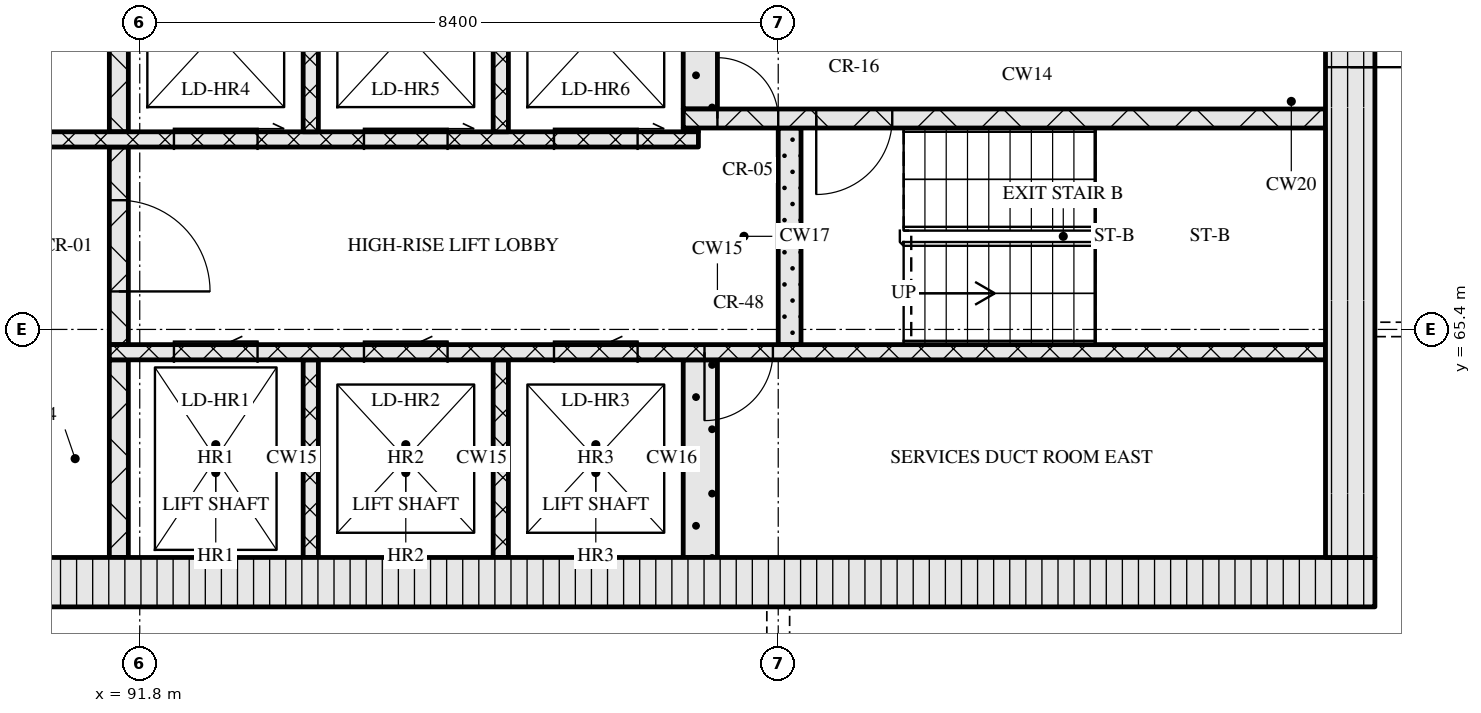
"""IFC4 building model, lengths in metres.
Left out: names, types, materials, properties, quantities, classifications, styles, units other than length and angle.
Written with IfcOpenShell. Run it as: python <this file> out.ifc"""

import sys

from ifc_helpers import new_model, si_unit, direction, frame, frame_2d, origin, place, context, subcontext, project, spatial, rectangle, extrude, element, fill, save


model = new_model("IFC4")
c1 = context("Model", 3, precision=1e-05, world=origin(), true_north=direction((0.0, 1.0)))
c2 = subcontext(c1, "Body", "Model", "MODEL_VIEW")
j1 = project(units=[si_unit("LENGTHUNIT", "METRE"), si_unit("PLANEANGLEUNIT", "RADIAN")], contexts=[c1])
p1 = place(None, origin())
s1 = spatial("IfcSite", under=j1, at=p1, CompositionType="ELEMENT")
p2 = place(p1, origin())
s2 = spatial("IfcBuilding", under=s1, at=p2, CompositionType="ELEMENT")
p3 = place(p2, frame((0.0, 0.0, 212.7)))
s3 = spatial("IfcBuildingStorey", under=s2, at=p3, CompositionType="ELEMENT", Elevation=212.7)
p4 = place(p3, frame((67.15, 62.075, 0.0), z_axis=(0.0, 0.0, 1.0), x_axis=(1.0, 0.0, 0.0)))
e1 = element("IfcWall", 1, at=p4, inside=s3, PredefinedType="SOLIDWALL", context=c2, shape_type="SweptSolid", body=[
    extrude(rectangle(XDim=40.9, YDim=0.65, at=frame_2d((20.45, 0.0))), origin(), (0.0, 0.0, 1.0), 3.32),
])
p5 = place(p4, frame((20.8, 0.0, 0.0)))
e2 = element("IfcOpeningElement", 2, at=p5, cuts=e1, PredefinedType="OPENING", context=c2, shape_type="SweptSolid", body=[
    extrude(rectangle(XDim=1.8, YDim=2.1, at=frame_2d((0.9, 1.05))), frame((0.0, 0.335, 0.0), z_axis=(0.0, -1.0, 0.0), x_axis=(1.0, 0.0, 0.0)), (0.0, 0.0, 1.0), 0.67),
])
p6 = place(p3, frame((107.725, 62.4, 0.0), z_axis=(0.0, 0.0, 1.0), x_axis=(0.0, 1.0, 0.0)))
e3 = element("IfcWall", 3, at=p6, inside=s3, PredefinedType="SOLIDWALL", context=c2, shape_type="SweptSolid", body=[
    extrude(rectangle(XDim=12.0, YDim=0.65, at=frame_2d((6.0, 0.0))), origin(), (0.0, 0.0, 1.0), 3.32),
])
p7 = place(p6, frame((6.45, 0.0, 0.0)))
e4 = element("IfcOpeningElement", 4, at=p7, cuts=e3, PredefinedType="OPENING", context=c2, shape_type="SweptSolid", body=[
    extrude(rectangle(XDim=1.2, YDim=2.1, at=frame_2d((0.6, 1.05))), frame((0.0, 0.335, 0.0), z_axis=(0.0, -1.0, 0.0), x_axis=(1.0, 0.0, 0.0)), (0.0, 0.0, 1.0), 0.67),
])
p8 = place(p3, frame((91.525, 62.4, 0.0), z_axis=(0.0, 0.0, 1.0), x_axis=(0.0, 1.0, 0.0)))
e5 = element("IfcWall", 5, at=p8, inside=s3, PredefinedType="SOLIDWALL", context=c2, shape_type="SweptSolid", body=[
    extrude(rectangle(XDim=2.6, YDim=0.25, at=frame_2d((1.3, 0.0))), origin(), (0.0, 0.0, 1.0), 3.32),
])
for number, where, z_axis, x_axis in (
    (6, (94.05, 62.4, 0.0), (0.0, 0.0, 1.0), (0.0, 1.0, 0.0)),
    (7, (96.55, 62.4, 0.0), (0.0, 0.0, 1.0), (0.0, 1.0, 0.0)),
):
    element("IfcWall", number, at=place(p3, frame(where, z_axis=z_axis, x_axis=x_axis)), inside=s3, PredefinedType="SOLIDWALL", context=c2, shape_type="SweptSolid", body=[
        extrude(rectangle(XDim=2.6, YDim=0.2, at=frame_2d((1.3, 0.0))), origin(), (0.0, 0.0, 1.0), 3.32),
    ])
p9 = place(p3, frame((99.175, 62.4, 0.0), z_axis=(0.0, 0.0, 1.0), x_axis=(0.0, 1.0, 0.0)))
e8 = element("IfcWall", 8, at=p9, inside=s3, PredefinedType="SOLIDWALL", context=c2, shape_type="SweptSolid", body=[
    extrude(rectangle(XDim=2.6, YDim=0.45, at=frame_2d((1.3, 0.0))), origin(), (0.0, 0.0, 1.0), 3.32),
])
p10 = place(p3, frame((91.4, 65.1, 0.0), z_axis=(0.0, 0.0, 1.0), x_axis=(1.0, 0.0, 0.0)))
e9 = element("IfcWall", 9, at=p10, inside=s3, PredefinedType="SOLIDWALL", context=c2, shape_type="SweptSolid", body=[
    extrude(rectangle(XDim=16.0, YDim=0.2, at=frame_2d((8.0, 0.0))), origin(), (0.0, 0.0, 1.0), 3.32),
])
p11 = place(p10, frame((0.85, 0.0, 0.0)))
e10 = element("IfcOpeningElement", 10, at=p11, cuts=e9, PredefinedType="OPENING", context=c2, shape_type="SweptSolid", body=[
    extrude(rectangle(XDim=1.1, YDim=2.1, at=frame_2d((0.55, 1.05))), frame((0.0, 0.11, 0.0), z_axis=(0.0, -1.0, 0.0), x_axis=(1.0, 0.0, 0.0)), (0.0, 0.0, 1.0), 0.22),
])
p12 = place(p10, frame((3.35, 0.0, 0.0)))
e11 = element("IfcOpeningElement", 11, at=p12, cuts=e9, PredefinedType="OPENING", context=c2, shape_type="SweptSolid", body=[
    extrude(rectangle(XDim=1.1, YDim=2.1, at=frame_2d((0.55, 1.05))), frame((0.0, 0.11, 0.0), z_axis=(0.0, -1.0, 0.0), x_axis=(1.0, 0.0, 0.0)), (0.0, 0.0, 1.0), 0.22),
])
p13 = place(p10, frame((5.85, 0.0, 0.0)))
e12 = element("IfcOpeningElement", 12, at=p13, cuts=e9, PredefinedType="OPENING", context=c2, shape_type="SweptSolid", body=[
    extrude(rectangle(XDim=1.1, YDim=2.1, at=frame_2d((0.55, 1.05))), frame((0.0, 0.11, 0.0), z_axis=(0.0, -1.0, 0.0), x_axis=(1.0, 0.0, 0.0)), (0.0, 0.0, 1.0), 0.22),
])
p14 = place(p10, frame((7.83, 0.0, 0.0)))
e13 = element("IfcOpeningElement", 13, at=p14, cuts=e9, PredefinedType="OPENING", context=c2, shape_type="SweptSolid", body=[
    extrude(rectangle(XDim=0.9, YDim=2.1, at=frame_2d((0.45, 1.05))), frame((0.0, 0.11, 0.0), z_axis=(0.0, -1.0, 0.0), x_axis=(1.0, 0.0, 0.0)), (0.0, 0.0, 1.0), 0.22),
])
p15 = place(p3, frame((91.525, 65.2, 0.0), z_axis=(0.0, 0.0, 1.0), x_axis=(0.0, 1.0, 0.0)))
e14 = element("IfcWall", 14, at=p15, inside=s3, PredefinedType="SOLIDWALL", context=c2, shape_type="SweptSolid", body=[
    extrude(rectangle(XDim=2.6, YDim=0.25, at=frame_2d((1.3, 0.0))), origin(), (0.0, 0.0, 1.0), 3.32),
])
p16 = place(p15, frame((0.7, 0.0, 0.0)))
e15 = element("IfcOpeningElement", 15, at=p16, cuts=e14, PredefinedType="OPENING", context=c2, shape_type="SweptSolid", body=[
    extrude(rectangle(XDim=1.2, YDim=2.1, at=frame_2d((0.6, 1.05))), frame((0.0, 0.135, 0.0), z_axis=(0.0, -1.0, 0.0), x_axis=(1.0, 0.0, 0.0)), (0.0, 0.0, 1.0), 0.27),
])
p17 = place(p3, frame((100.35, 65.2, 0.0), z_axis=(0.0, 0.0, 1.0), x_axis=(0.0, 1.0, 0.0)))
e16 = element("IfcWall", 16, at=p17, inside=s3, PredefinedType="SOLIDWALL", context=c2, shape_type="SweptSolid", body=[
    extrude(rectangle(XDim=2.85, YDim=0.3, at=frame_2d((1.425, 0.0))), origin(), (0.0, 0.0, 1.0), 3.32),
])
p18 = place(p3, frame((76.05, 67.9, 0.0), z_axis=(0.0, 0.0, 1.0), x_axis=(1.0, 0.0, 0.0)))
e17 = element("IfcWall", 17, at=p18, inside=s3, PredefinedType="SOLIDWALL", context=c2, shape_type="SweptSolid", body=[
    extrude(rectangle(XDim=23.1, YDim=0.2, at=frame_2d((11.55, 0.0))), origin(), (0.0, 0.0, 1.0), 3.32),
])
p19 = place(p18, frame((1.4, 0.0, 0.0)))
e18 = element("IfcOpeningElement", 18, at=p19, cuts=e17, PredefinedType="OPENING", context=c2, shape_type="SweptSolid", body=[
    extrude(rectangle(XDim=0.9, YDim=2.1, at=frame_2d((0.45, 1.05))), frame((0.0, 0.11, 0.0), z_axis=(0.0, -1.0, 0.0), x_axis=(1.0, 0.0, 0.0)), (0.0, 0.0, 1.0), 0.22),
])
p20 = place(p18, frame((5.11, 0.0, 0.0)))
e19 = element("IfcOpeningElement", 19, at=p20, cuts=e17, PredefinedType="OPENING", context=c2, shape_type="SweptSolid", body=[
    extrude(rectangle(XDim=0.9, YDim=2.1, at=frame_2d((0.45, 1.05))), frame((0.0, 0.11, 0.0), z_axis=(0.0, -1.0, 0.0), x_axis=(1.0, 0.0, 0.0)), (0.0, 0.0, 1.0), 0.22),
])
p21 = place(p18, frame((8.45, 0.0, 0.0)))
e20 = element("IfcOpeningElement", 20, at=p21, cuts=e17, PredefinedType="OPENING", context=c2, shape_type="SweptSolid", body=[
    extrude(rectangle(XDim=0.9, YDim=2.1, at=frame_2d((0.45, 1.05))), frame((0.0, 0.11, 0.0), z_axis=(0.0, -1.0, 0.0), x_axis=(1.0, 0.0, 0.0)), (0.0, 0.0, 1.0), 0.22),
])
p22 = place(p18, frame((10.91, 0.0, 0.0)))
e21 = element("IfcOpeningElement", 21, at=p22, cuts=e17, PredefinedType="OPENING", context=c2, shape_type="SweptSolid", body=[
    extrude(rectangle(XDim=0.9, YDim=2.1, at=frame_2d((0.45, 1.05))), frame((0.0, 0.11, 0.0), z_axis=(0.0, -1.0, 0.0), x_axis=(1.0, 0.0, 0.0)), (0.0, 0.0, 1.0), 0.22),
])
p23 = place(p18, frame((13.55, 0.0, 0.0)))
e22 = element("IfcOpeningElement", 22, at=p23, cuts=e17, PredefinedType="OPENING", context=c2, shape_type="SweptSolid", body=[
    extrude(rectangle(XDim=1.0, YDim=2.1, at=frame_2d((0.5, 1.05))), frame((0.0, 0.11, 0.0), z_axis=(0.0, -1.0, 0.0), x_axis=(1.0, 0.0, 0.0)), (0.0, 0.0, 1.0), 0.22),
])
p24 = place(p18, frame((16.2, 0.0, 0.0)))
e23 = element("IfcOpeningElement", 23, at=p24, cuts=e17, PredefinedType="OPENING", context=c2, shape_type="SweptSolid", body=[
    extrude(rectangle(XDim=1.1, YDim=2.1, at=frame_2d((0.55, 1.05))), frame((0.0, 0.11, 0.0), z_axis=(0.0, -1.0, 0.0), x_axis=(1.0, 0.0, 0.0)), (0.0, 0.0, 1.0), 0.22),
])
p25 = place(p18, frame((18.7, 0.0, 0.0)))
e24 = element("IfcOpeningElement", 24, at=p25, cuts=e17, PredefinedType="OPENING", context=c2, shape_type="SweptSolid", body=[
    extrude(rectangle(XDim=1.1, YDim=2.1, at=frame_2d((0.55, 1.05))), frame((0.0, 0.11, 0.0), z_axis=(0.0, -1.0, 0.0), x_axis=(1.0, 0.0, 0.0)), (0.0, 0.0, 1.0), 0.22),
])
p26 = place(p18, frame((21.2, 0.0, 0.0)))
e25 = element("IfcOpeningElement", 25, at=p26, cuts=e17, PredefinedType="OPENING", context=c2, shape_type="SweptSolid", body=[
    extrude(rectangle(XDim=1.1, YDim=2.1, at=frame_2d((0.55, 1.05))), frame((0.0, 0.11, 0.0), z_axis=(0.0, -1.0, 0.0), x_axis=(1.0, 0.0, 0.0)), (0.0, 0.0, 1.0), 0.22),
])
p27 = place(p3, frame((91.525, 68.0, 0.0), z_axis=(0.0, 0.0, 1.0), x_axis=(0.0, 1.0, 0.0)))
e26 = element("IfcWall", 26, at=p27, inside=s3, PredefinedType="SOLIDWALL", context=c2, shape_type="SweptSolid", body=[
    extrude(rectangle(XDim=2.6, YDim=0.25, at=frame_2d((1.3, 0.0))), origin(), (0.0, 0.0, 1.0), 3.32),
])
for number, where, z_axis, x_axis in (
    (27, (94.05, 68.0, 0.0), (0.0, 0.0, 1.0), (0.0, 1.0, 0.0)),
    (28, (96.55, 68.0, 0.0), (0.0, 0.0, 1.0), (0.0, 1.0, 0.0)),
):
    element("IfcWall", number, at=place(p3, frame(where, z_axis=z_axis, x_axis=x_axis)), inside=s3, PredefinedType="SOLIDWALL", context=c2, shape_type="SweptSolid", body=[
        extrude(rectangle(XDim=2.6, YDim=0.2, at=frame_2d((1.3, 0.0))), origin(), (0.0, 0.0, 1.0), 3.32),
    ])
p28 = place(p3, frame((98.95, 68.025, 0.0), z_axis=(0.0, 0.0, 1.0), x_axis=(1.0, 0.0, 0.0)))
e29 = element("IfcWall", 29, at=p28, inside=s3, PredefinedType="SOLIDWALL", context=c2, shape_type="SweptSolid", body=[
    extrude(rectangle(XDim=0.2, YDim=0.05, at=frame_2d((0.1, 0.0))), origin(), (0.0, 0.0, 1.0), 3.32),
])
p29 = place(p3, frame((98.95, 68.175, 0.0), z_axis=(0.0, 0.0, 1.0), x_axis=(1.0, 0.0, 0.0)))
e30 = element("IfcWall", 30, at=p29, inside=s3, PredefinedType="SOLIDWALL", context=c2, shape_type="SweptSolid", body=[
    extrude(rectangle(XDim=8.45, YDim=0.25, at=frame_2d((4.225, 0.0))), origin(), (0.0, 0.0, 1.0), 3.32),
])
p30 = place(p29, frame((0.45, 0.0, 0.0)))
e31 = element("IfcOpeningElement", 31, at=p30, cuts=e30, PredefinedType="OPENING", context=c2, shape_type="SweptSolid", body=[
    extrude(rectangle(XDim=0.8, YDim=2.1, at=frame_2d((0.4, 1.05))), frame((0.0, 0.135, 0.0), z_axis=(0.0, -1.0, 0.0), x_axis=(1.0, 0.0, 0.0)), (0.0, 0.0, 1.0), 0.27),
])
p31 = place(p29, frame((1.75, 0.0, 0.0)))
e32 = element("IfcOpeningElement", 32, at=p31, cuts=e30, PredefinedType="OPENING", context=c2, shape_type="SweptSolid", body=[
    extrude(rectangle(XDim=1.0, YDim=2.1, at=frame_2d((0.5, 1.05))), frame((0.0, 0.135, 0.0), z_axis=(0.0, -1.0, 0.0), x_axis=(1.0, 0.0, 0.0)), (0.0, 0.0, 1.0), 0.27),
])
p32 = place(p3, frame((99.175, 68.3, 0.0), z_axis=(0.0, 0.0, 1.0), x_axis=(0.0, 1.0, 0.0)))
e33 = element("IfcWall", 33, at=p32, inside=s3, PredefinedType="SOLIDWALL", context=c2, shape_type="SweptSolid", body=[
    extrude(rectangle(XDim=2.3, YDim=0.45, at=frame_2d((1.15, 0.0))), origin(), (0.0, 0.0, 1.0), 3.32),
])
p33 = place(p11, origin())
e34 = element("IfcDoor", 34, at=p33, inside=s3, OperationType="SLIDING_TO_LEFT", PredefinedType="DOOR", context=c2, shape_type="SweptSolid", body=[
    extrude(rectangle(XDim=1.1, YDim=2.1, at=frame_2d((0.55, 1.05))), frame((0.0, 0.025, 0.0), z_axis=(0.0, -1.0, 0.0), x_axis=(1.0, 0.0, 0.0)), (0.0, 0.0, 1.0), 0.05),
])
fill(e10, e34)
p34 = place(p12, origin())
e35 = element("IfcDoor", 35, at=p34, inside=s3, OperationType="SLIDING_TO_LEFT", PredefinedType="DOOR", context=c2, shape_type="SweptSolid", body=[
    extrude(rectangle(XDim=1.1, YDim=2.1, at=frame_2d((0.55, 1.05))), frame((0.0, 0.025, 0.0), z_axis=(0.0, -1.0, 0.0), x_axis=(1.0, 0.0, 0.0)), (0.0, 0.0, 1.0), 0.05),
])
fill(e11, e35)
p35 = place(p13, origin())
e36 = element("IfcDoor", 36, at=p35, inside=s3, OperationType="SLIDING_TO_LEFT", PredefinedType="DOOR", context=c2, shape_type="SweptSolid", body=[
    extrude(rectangle(XDim=1.1, YDim=2.1, at=frame_2d((0.55, 1.05))), frame((0.0, 0.025, 0.0), z_axis=(0.0, -1.0, 0.0), x_axis=(1.0, 0.0, 0.0)), (0.0, 0.0, 1.0), 0.05),
])
fill(e12, e36)
p36 = place(p14, origin())
e37 = element("IfcDoor", 37, at=p36, inside=s3, OperationType="SINGLE_SWING_RIGHT", PredefinedType="DOOR", context=c2, shape_type="SweptSolid", body=[
    extrude(rectangle(XDim=0.9, YDim=2.1, at=frame_2d((0.45, 1.05))), frame((0.0, 0.025, 0.0), z_axis=(0.0, -1.0, 0.0), x_axis=(1.0, 0.0, 0.0)), (0.0, 0.0, 1.0), 0.05),
])
fill(e13, e37)
p37 = place(p16, origin())
e38 = element("IfcDoor", 38, at=p37, inside=s3, OperationType="SINGLE_SWING_RIGHT", PredefinedType="DOOR", context=c2, shape_type="SweptSolid", body=[
    extrude(rectangle(XDim=1.2, YDim=2.1, at=frame_2d((0.6, 1.05))), frame((0.0, 0.025, 0.0), z_axis=(0.0, -1.0, 0.0), x_axis=(1.0, 0.0, 0.0)), (0.0, 0.0, 1.0), 0.05),
])
fill(e15, e38)
p38 = place(p24, origin())
e39 = element("IfcDoor", 39, at=p38, inside=s3, OperationType="SLIDING_TO_RIGHT", PredefinedType="DOOR", context=c2, shape_type="SweptSolid", body=[
    extrude(rectangle(XDim=1.1, YDim=2.1, at=frame_2d((0.55, 1.05))), frame((0.0, 0.025, 0.0), z_axis=(0.0, -1.0, 0.0), x_axis=(1.0, 0.0, 0.0)), (0.0, 0.0, 1.0), 0.05),
])
fill(e23, e39)
p39 = place(p25, origin())
e40 = element("IfcDoor", 40, at=p39, inside=s3, OperationType="SLIDING_TO_RIGHT", PredefinedType="DOOR", context=c2, shape_type="SweptSolid", body=[
    extrude(rectangle(XDim=1.1, YDim=2.1, at=frame_2d((0.55, 1.05))), frame((0.0, 0.025, 0.0), z_axis=(0.0, -1.0, 0.0), x_axis=(1.0, 0.0, 0.0)), (0.0, 0.0, 1.0), 0.05),
])
fill(e24, e40)
p40 = place(p26, origin())
e41 = element("IfcDoor", 41, at=p40, inside=s3, OperationType="SLIDING_TO_RIGHT", PredefinedType="DOOR", context=c2, shape_type="SweptSolid", body=[
    extrude(rectangle(XDim=1.1, YDim=2.1, at=frame_2d((0.55, 1.05))), frame((0.0, 0.025, 0.0), z_axis=(0.0, -1.0, 0.0), x_axis=(1.0, 0.0, 0.0)), (0.0, 0.0, 1.0), 0.05),
])
fill(e25, e41)
p41 = place(p30, origin())
e42 = element("IfcDoor", 42, at=p41, inside=s3, OperationType="SINGLE_SWING_LEFT", PredefinedType="DOOR", context=c2, shape_type="SweptSolid", body=[
    extrude(rectangle(XDim=0.8, YDim=2.1, at=frame_2d((0.4, 1.05))), frame((0.0, 0.025, 0.0), z_axis=(0.0, -1.0, 0.0), x_axis=(1.0, 0.0, 0.0)), (0.0, 0.0, 1.0), 0.05),
])
fill(e31, e42)
p42 = place(p31, origin())
e43 = element("IfcDoor", 43, at=p42, inside=s3, OperationType="SINGLE_SWING_RIGHT", PredefinedType="DOOR", context=c2, shape_type="SweptSolid", body=[
    extrude(rectangle(XDim=1.0, YDim=2.1, at=frame_2d((0.5, 1.05))), frame((0.0, 0.025, 0.0), z_axis=(0.0, -1.0, 0.0), x_axis=(1.0, 0.0, 0.0)), (0.0, 0.0, 1.0), 0.05),
])
fill(e32, e43)
p43 = place(p7, origin())
e44 = element("IfcDoor", 44, at=p43, inside=s3, OperationType="SINGLE_SWING_RIGHT", PredefinedType="DOOR", context=c2, shape_type="SweptSolid", body=[
    extrude(rectangle(XDim=1.2, YDim=2.1, at=frame_2d((0.6, 1.05))), frame((0.0, 0.025, 0.0), z_axis=(0.0, -1.0, 0.0), x_axis=(1.0, 0.0, 0.0)), (0.0, 0.0, 1.0), 0.05),
])
fill(e4, e44)
save(model, sys.argv[1])
